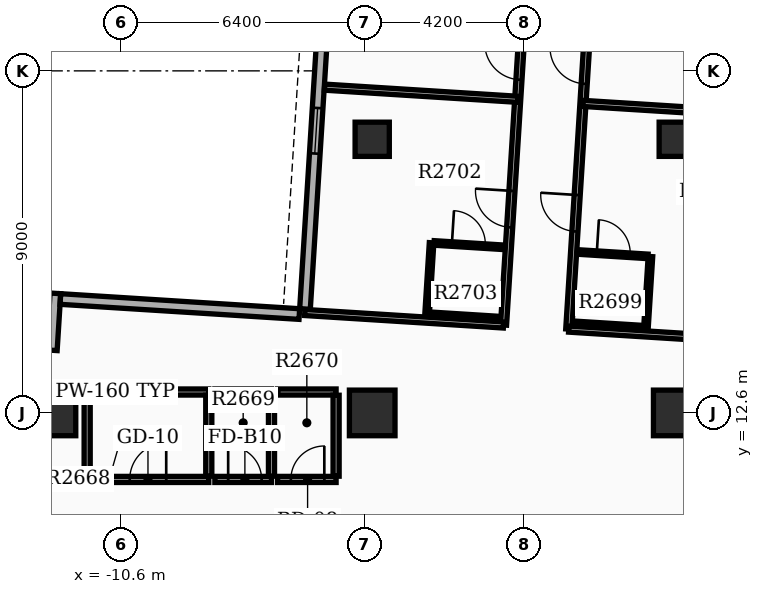
"""IFC4 building model, lengths in metres.
Left out: names, types, materials, properties, quantities, classifications, styles, units other than length and angle.
Written with IfcOpenShell. Run it as: python <this file> out.ifc"""

import sys

from ifc_helpers import new_model, si_unit, direction, frame, frame_2d, origin, origin_2d, place, context, subcontext, project, spatial, rectangle, extrude, element, fill, save


model = new_model("IFC4")
c1 = context("Model", 3, precision=1e-05, world=origin(), true_north=direction((0.0, 1.0)))
c2 = subcontext(c1, "Body", "Model", "MODEL_VIEW")
j1 = project(units=[si_unit("LENGTHUNIT", "METRE"), si_unit("PLANEANGLEUNIT", "RADIAN")], contexts=[c1])
p1 = place(None, origin())
s1 = spatial("IfcSite", under=j1, at=p1, CompositionType="ELEMENT")
p2 = place(p1, origin())
s2 = spatial("IfcBuilding", under=s1, at=p2, CompositionType="ELEMENT")
p3 = place(p2, frame((0.0, 0.0, 168.3)))
s3 = spatial("IfcBuildingStorey", under=s2, at=p3, CompositionType="ELEMENT", Elevation=168.3)
for number, where, z_axis, x_axis in (
    (1, (-12.4, 12.6, 0.0), (0.0, 0.0, 1.0), (1.0, 0.0, 0.0)),
    (2, (4.0, 12.6, 0.0), (0.0, 0.0, 1.0), (1.0, 0.0, 0.0)),
    (3, (-4.0, 12.6, 0.0), (0.0, 0.0, 1.0), (1.0, 0.0, 0.0)),
):
    element("IfcColumn", number, at=place(p3, frame(where, z_axis=z_axis, x_axis=x_axis)), inside=s3, PredefinedType="COLUMN", context=c2, shape_type="SweptSolid", body=[
        extrude(rectangle(XDim=1.2, YDim=1.2, at=origin_2d()), origin(), (0.0, 0.0, 1.0), 3.9),
    ])
for number, where, z_axis, x_axis in (
    (4, (-4.0, 19.8, 0.0), (0.0, 0.0, 1.0), (1.0, 0.0, 0.0)),
    (5, (4.0, 19.8, 0.0), (0.0, 0.0, 1.0), (1.0, 0.0, 0.0)),
):
    element("IfcColumn", number, at=place(p3, frame(where, z_axis=z_axis, x_axis=x_axis)), inside=s3, PredefinedType="COLUMN", context=c2, shape_type="SweptSolid", body=[
        extrude(rectangle(XDim=0.9, YDim=0.9, at=origin_2d()), origin(), (0.0, 0.0, 1.0), 3.9),
    ])
p4 = place(p3, frame((-4.507, 35.393, 0.0), z_axis=(0.0, 0.0, 1.0), x_axis=(-0.062784355807, -0.998027116198, 0.0)))
e6 = element("IfcWall", 6, at=p4, inside=s3, PredefinedType="STANDARD", context=c2, shape_type="SweptSolid", body=[
    extrude(rectangle(XDim=20.1, YDim=0.28, at=frame_2d((10.05, 0.0))), origin(), (0.0, 0.0, 1.0), 2.97),
])
p5 = place(p4, frame((0.85, 0.0, 0.8)))
e7 = element("IfcOpeningElement", 7, at=p5, cuts=e6, PredefinedType="OPENING", context=c2, shape_type="SweptSolid", body=[
    extrude(rectangle(XDim=1.4, YDim=1.6, at=frame_2d((0.7, 0.8))), frame((0.0, 0.15, 0.0), z_axis=(0.0, -1.0, 0.0), x_axis=(1.0, 0.0, 0.0)), (0.0, 0.0, 1.0), 0.3),
])
p6 = place(p4, frame((4.05, 0.0, 0.8)))
e8 = element("IfcOpeningElement", 8, at=p6, cuts=e6, PredefinedType="OPENING", context=c2, shape_type="SweptSolid", body=[
    extrude(rectangle(XDim=1.4, YDim=1.6, at=frame_2d((0.7, 0.8))), frame((0.0, 0.15, 0.0), z_axis=(0.0, -1.0, 0.0), x_axis=(1.0, 0.0, 0.0)), (0.0, 0.0, 1.0), 0.3),
])
p7 = place(p4, frame((7.25, 0.0, 0.8)))
e9 = element("IfcOpeningElement", 9, at=p7, cuts=e6, PredefinedType="OPENING", context=c2, shape_type="SweptSolid", body=[
    extrude(rectangle(XDim=1.4, YDim=1.6, at=frame_2d((0.7, 0.8))), frame((0.0, 0.15, 0.0), z_axis=(0.0, -1.0, 0.0), x_axis=(1.0, 0.0, 0.0)), (0.0, 0.0, 1.0), 0.3),
])
p8 = place(p4, frame((10.95, 0.0, 0.8)))
e10 = element("IfcOpeningElement", 10, at=p8, cuts=e6, PredefinedType="OPENING", context=c2, shape_type="SweptSolid", body=[
    extrude(rectangle(XDim=1.4, YDim=1.6, at=frame_2d((0.7, 0.8))), frame((0.0, 0.15, 0.0), z_axis=(0.0, -1.0, 0.0), x_axis=(1.0, 0.0, 0.0)), (0.0, 0.0, 1.0), 0.3),
])
p9 = place(p4, frame((14.799, 0.0, 0.85)))
e11 = element("IfcOpeningElement", 11, at=p9, cuts=e6, PredefinedType="OPENING", context=c2, shape_type="SweptSolid", body=[
    extrude(rectangle(XDim=1.2, YDim=1.6, at=frame_2d((0.6, 0.8))), frame((0.0, 0.15, 0.0), z_axis=(0.0, -1.0, 0.0), x_axis=(1.0, 0.0, 0.0)), (0.0, 0.0, 1.0), 0.3),
])
p10 = place(p3, frame((-12.43, 14.249, 0.0), z_axis=(0.0, 0.0, 1.0), x_axis=(0.062824119533, 0.998024613927, 0.0)))
e12 = element("IfcWall", 12, at=p10, inside=s3, PredefinedType="STANDARD", context=c2, shape_type="SweptSolid", body=[
    extrude(rectangle(XDim=1.5, YDim=0.28, at=frame_2d((0.75, 0.0))), origin(), (0.0, 0.0, 1.0), 2.97),
])
p11 = place(p3, frame((-12.205, 15.597, 0.0), z_axis=(0.0, 0.0, 1.0), x_axis=(0.998024885752, -0.062819801181, 0.0)))
e13 = element("IfcWall", 13, at=p11, inside=s3, PredefinedType="STANDARD", context=c2, shape_type="SweptSolid", body=[
    extrude(rectangle(XDim=6.3, YDim=0.28, at=frame_2d((3.15, 0.0))), origin(), (0.0, 0.0, 1.0), 2.97),
])
p12 = place(p3, frame((-11.5, 10.85, 0.0), z_axis=(0.0, 0.0, 1.0), x_axis=(1.0, 0.0, 0.0)))
e14 = element("IfcWall", 14, at=p12, inside=s3, PredefinedType="PARTITIONING", context=c2, shape_type="SweptSolid", body=[
    extrude(rectangle(XDim=3.2, YDim=0.16, at=frame_2d((1.6, 0.0))), origin(), (0.0, 0.0, 1.0), 2.96),
])
p13 = place(p12, frame((1.12, 0.0, 0.0)))
e15 = element("IfcOpeningElement", 15, at=p13, cuts=e14, PredefinedType="OPENING", context=c2, shape_type="SweptSolid", body=[
    extrude(rectangle(XDim=0.96, YDim=2.15, at=frame_2d((0.48, 1.075))), frame((0.0, 0.09, 0.0), z_axis=(0.0, -1.0, 0.0), x_axis=(1.0, 0.0, 0.0)), (0.0, 0.0, 1.0), 0.18),
])
p14 = place(p3, frame((-11.5, 13.15, 0.0), z_axis=(0.0, 0.0, 1.0), x_axis=(1.0, 0.0, 0.0)))
e16 = element("IfcWall", 16, at=p14, inside=s3, PredefinedType="PARTITIONING", context=c2, shape_type="SweptSolid", body=[
    extrude(rectangle(XDim=3.2, YDim=0.16, at=frame_2d((1.6, 0.0))), origin(), (0.0, 0.0, 1.0), 2.96),
])
for number, where, z_axis, x_axis in (
    (17, (-11.5, 10.935, 0.0), (0.0, 0.0, 1.0), (0.0, 1.0, 0.0)),
    (18, (-8.3, 10.935, 0.0), (0.0, 0.0, 1.0), (0.0, 1.0, 0.0)),
):
    element("IfcWall", number, at=place(p3, frame(where, z_axis=z_axis, x_axis=x_axis)), inside=s3, PredefinedType="PARTITIONING", context=c2, shape_type="SweptSolid", body=[
        extrude(rectangle(XDim=2.13, YDim=0.16, at=frame_2d((1.065, 0.0))), origin(), (0.0, 0.0, 1.0), 2.96),
    ])
p15 = place(p3, frame((-8.14, 10.85, 0.0), z_axis=(0.0, 0.0, 1.0), x_axis=(1.0, 0.0, 0.0)))
e19 = element("IfcWall", 19, at=p15, inside=s3, PredefinedType="PARTITIONING", context=c2, shape_type="SweptSolid", body=[
    extrude(rectangle(XDim=1.49, YDim=0.16, at=frame_2d((0.745, 0.0))), origin(), (0.0, 0.0, 1.0), 2.96),
])
p16 = place(p15, frame((0.35, 0.0, 0.0)))
e20 = element("IfcOpeningElement", 20, at=p16, cuts=e19, PredefinedType="OPENING", context=c2, shape_type="SweptSolid", body=[
    extrude(rectangle(XDim=0.88, YDim=2.1, at=frame_2d((0.44, 1.05))), frame((0.0, 0.09, 0.0), z_axis=(0.0, -1.0, 0.0), x_axis=(1.0, 0.0, 0.0)), (0.0, 0.0, 1.0), 0.18),
])
p17 = place(p3, frame((-8.14, 13.15, 0.0), z_axis=(0.0, 0.0, 1.0), x_axis=(1.0, 0.0, 0.0)))
e21 = element("IfcWall", 21, at=p17, inside=s3, PredefinedType="PARTITIONING", context=c2, shape_type="SweptSolid", body=[
    extrude(rectangle(XDim=1.49, YDim=0.16, at=frame_2d((0.745, 0.0))), origin(), (0.0, 0.0, 1.0), 2.96),
])
p18 = place(p3, frame((-6.65, 10.935, 0.0), z_axis=(0.0, 0.0, 1.0), x_axis=(0.0, 1.0, 0.0)))
e22 = element("IfcWall", 22, at=p18, inside=s3, PredefinedType="PARTITIONING", context=c2, shape_type="SweptSolid", body=[
    extrude(rectangle(XDim=2.13, YDim=0.16, at=frame_2d((1.065, 0.0))), origin(), (0.0, 0.0, 1.0), 2.96),
])
p19 = place(p3, frame((-6.49, 10.85, 0.0), z_axis=(0.0, 0.0, 1.0), x_axis=(1.0, 0.0, 0.0)))
e23 = element("IfcWall", 23, at=p19, inside=s3, PredefinedType="PARTITIONING", context=c2, shape_type="SweptSolid", body=[
    extrude(rectangle(XDim=1.54, YDim=0.16, at=frame_2d((0.77, 0.0))), origin(), (0.0, 0.0, 1.0), 2.96),
])
p20 = place(p19, frame((0.35, 0.0, 0.0)))
e24 = element("IfcOpeningElement", 24, at=p20, cuts=e23, PredefinedType="OPENING", context=c2, shape_type="SweptSolid", body=[
    extrude(rectangle(XDim=0.88, YDim=2.15, at=frame_2d((0.44, 1.075))), frame((0.0, 0.09, 0.0), z_axis=(0.0, -1.0, 0.0), x_axis=(1.0, 0.0, 0.0)), (0.0, 0.0, 1.0), 0.18),
])
p21 = place(p3, frame((-6.49, 13.15, 0.0), z_axis=(0.0, 0.0, 1.0), x_axis=(1.0, 0.0, 0.0)))
e25 = element("IfcWall", 25, at=p21, inside=s3, PredefinedType="PARTITIONING", context=c2, shape_type="SweptSolid", body=[
    extrude(rectangle(XDim=1.54, YDim=0.16, at=frame_2d((0.77, 0.0))), origin(), (0.0, 0.0, 1.0), 2.96),
])
p22 = place(p3, frame((-4.95, 10.935, 0.0), z_axis=(0.0, 0.0, 1.0), x_axis=(0.0, 1.0, 0.0)))
e26 = element("IfcWall", 26, at=p22, inside=s3, PredefinedType="PARTITIONING", context=c2, shape_type="SweptSolid", body=[
    extrude(rectangle(XDim=2.13, YDim=0.16, at=frame_2d((1.065, 0.0))), origin(), (0.0, 0.0, 1.0), 2.96),
])
p23 = place(p3, frame((1.172, 14.806, 0.0), z_axis=(0.0, 0.0, 1.0), x_axis=(0.062771584278, 0.998027919553, 0.0)))
e27 = element("IfcWall", 27, at=p23, inside=s3, PredefinedType="PARTITIONING", context=c2, shape_type="SweptSolid", body=[
    extrude(rectangle(XDim=9.7, YDim=0.16, at=frame_2d((4.85, 0.0))), origin(), (0.0, 0.0, 1.0), 2.96),
])
p24 = place(p23, frame((2.575, 0.0, 0.0)))
e28 = element("IfcOpeningElement", 28, at=p24, cuts=e27, PredefinedType="OPENING", context=c2, shape_type="SweptSolid", body=[
    extrude(rectangle(XDim=0.96, YDim=2.15, at=frame_2d((0.48, 1.075))), frame((0.0, 0.09, 0.0), z_axis=(0.0, -1.0, 0.0), x_axis=(1.0, 0.0, 0.0)), (0.0, 0.0, 1.0), 0.18),
])
p25 = place(p23, frame((6.467, 0.0, 0.0)))
e29 = element("IfcOpeningElement", 29, at=p25, cuts=e27, PredefinedType="OPENING", context=c2, shape_type="SweptSolid", body=[
    extrude(rectangle(XDim=0.96, YDim=2.15, at=frame_2d((0.48, 1.075))), frame((0.0, 0.09, 0.0), z_axis=(0.0, -1.0, 0.0), x_axis=(1.0, 0.0, 0.0)), (0.0, 0.0, 1.0), 0.18),
])
p26 = place(p3, frame((1.172, 14.806, 0.0), z_axis=(0.0, 0.0, 1.0), x_axis=(0.998025657815, -0.06280753413, 0.0)))
e30 = element("IfcWall", 30, at=p26, inside=s3, PredefinedType="PARTITIONING", context=c2, shape_type="SweptSolid", body=[
    extrude(rectangle(XDim=6.48, YDim=0.16, at=frame_2d((3.24, 0.0))), origin(), (0.0, 0.0, 1.0), 2.96),
])
p27 = place(p3, frame((1.546, 20.744, 0.0), z_axis=(0.0, 0.0, 1.0), x_axis=(0.998025479614, -0.06281036572, 0.0)))
e31 = element("IfcWall", 31, at=p27, inside=s3, PredefinedType="PARTITIONING", context=c2, shape_type="SweptSolid", body=[
    extrude(rectangle(XDim=6.332, YDim=0.16, at=frame_2d((3.166, 0.0))), origin(), (0.0, 0.0, 1.0), 2.96),
])
p28 = place(p3, frame((1.44, 16.833, 0.0), z_axis=(0.0, 0.0, 1.0), x_axis=(0.998027443946, -0.062779145668, 0.0)))
e32 = element("IfcWall", 32, at=p28, inside=s3, PredefinedType="PARTITIONING", context=c2, shape_type="SweptSolid", body=[
    extrude(rectangle(XDim=1.82, YDim=0.12, at=frame_2d((0.91, 0.0))), origin(), (0.0, 0.0, 1.0), 2.96),
])
p29 = place(p28, frame((0.47, 0.0, 0.0)))
e33 = element("IfcOpeningElement", 33, at=p29, cuts=e32, PredefinedType="OPENING", context=c2, shape_type="SweptSolid", body=[
    extrude(rectangle(XDim=0.88, YDim=2.1, at=frame_2d((0.44, 1.05))), frame((0.0, 0.07, 0.0), z_axis=(0.0, -1.0, 0.0), x_axis=(1.0, 0.0, 0.0)), (0.0, 0.0, 1.0), 0.14),
])
p30 = place(p3, frame((1.322, 14.957, 0.0), z_axis=(0.0, 0.0, 1.0), x_axis=(0.998027443946, -0.062779145668, 0.0)))
e34 = element("IfcWall", 34, at=p30, inside=s3, PredefinedType="PARTITIONING", context=c2, shape_type="SweptSolid", body=[
    extrude(rectangle(XDim=1.82, YDim=0.12, at=frame_2d((0.91, 0.0))), origin(), (0.0, 0.0, 1.0), 2.96),
])
p31 = place(p3, frame((3.203, 14.838, 0.0), z_axis=(0.0, 0.0, 1.0), x_axis=(0.062847152131, 0.998023163794, 0.0)))
e35 = element("IfcWall", 35, at=p31, inside=s3, PredefinedType="PARTITIONING", context=c2, shape_type="SweptSolid", body=[
    extrude(rectangle(XDim=1.88, YDim=0.12, at=frame_2d((0.94, 0.0))), origin(), (0.0, 0.0, 1.0), 2.96),
])
p32 = place(p3, frame((-0.545, 14.914, 0.0), z_axis=(0.0, 0.0, 1.0), x_axis=(0.062796654085, 0.998026342456, 0.0)))
e36 = element("IfcWall", 36, at=p32, inside=s3, PredefinedType="PARTITIONING", context=c2, shape_type="SweptSolid", body=[
    extrude(rectangle(XDim=9.7, YDim=0.16, at=frame_2d((4.85, 0.0))), origin(), (0.0, 0.0, 1.0), 2.96),
])
p33 = place(p32, frame((2.575, 0.0, 0.0)))
e37 = element("IfcOpeningElement", 37, at=p33, cuts=e36, PredefinedType="OPENING", context=c2, shape_type="SweptSolid", body=[
    extrude(rectangle(XDim=0.96, YDim=2.15, at=frame_2d((0.48, 1.075))), frame((0.0, 0.09, 0.0), z_axis=(0.0, -1.0, 0.0), x_axis=(1.0, 0.0, 0.0)), (0.0, 0.0, 1.0), 0.18),
])
p34 = place(p32, frame((6.467, 0.0, 0.0)))
e38 = element("IfcOpeningElement", 38, at=p34, cuts=e36, PredefinedType="OPENING", context=c2, shape_type="SweptSolid", body=[
    extrude(rectangle(XDim=0.96, YDim=2.15, at=frame_2d((0.48, 1.075))), frame((0.0, 0.09, 0.0), z_axis=(0.0, -1.0, 0.0), x_axis=(1.0, 0.0, 0.0)), (0.0, 0.0, 1.0), 0.18),
])
p35 = place(p3, frame((-0.545, 14.914, 0.0), z_axis=(0.0, 0.0, 1.0), x_axis=(-0.998025838074, 0.062804669704, 0.0)))
e39 = element("IfcWall", 39, at=p35, inside=s3, PredefinedType="PARTITIONING", context=c2, shape_type="SweptSolid", body=[
    extrude(rectangle(XDim=5.24, YDim=0.16, at=frame_2d((2.62, 0.0))), origin(), (0.0, 0.0, 1.0), 2.96),
])
p36 = place(p3, frame((-0.171, 20.852, 0.0), z_axis=(0.0, 0.0, 1.0), x_axis=(-0.998025621735, 0.06280810744, 0.0)))
e40 = element("IfcWall", 40, at=p36, inside=s3, PredefinedType="PARTITIONING", context=c2, shape_type="SweptSolid", body=[
    extrude(rectangle(XDim=5.092, YDim=0.16, at=frame_2d((2.546, 0.0))), origin(), (0.0, 0.0, 1.0), 2.96),
])
p37 = place(p3, frame((-2.373, 17.073, 0.0), z_axis=(0.0, 0.0, 1.0), x_axis=(0.998027443946, -0.062779145668, 0.0)))
e41 = element("IfcWall", 41, at=p37, inside=s3, PredefinedType="PARTITIONING", context=c2, shape_type="SweptSolid", body=[
    extrude(rectangle(XDim=1.82, YDim=0.12, at=frame_2d((0.91, 0.0))), origin(), (0.0, 0.0, 1.0), 2.96),
])
p38 = place(p37, frame((0.47, 0.0, 0.0)))
e42 = element("IfcOpeningElement", 42, at=p38, cuts=e41, PredefinedType="OPENING", context=c2, shape_type="SweptSolid", body=[
    extrude(rectangle(XDim=0.88, YDim=2.1, at=frame_2d((0.44, 1.05))), frame((0.0, 0.07, 0.0), z_axis=(0.0, -1.0, 0.0), x_axis=(1.0, 0.0, 0.0)), (0.0, 0.0, 1.0), 0.14),
])
p39 = place(p3, frame((-2.491, 15.196, 0.0), z_axis=(0.0, 0.0, 1.0), x_axis=(0.998027443946, -0.062779145668, 0.0)))
e43 = element("IfcWall", 43, at=p39, inside=s3, PredefinedType="PARTITIONING", context=c2, shape_type="SweptSolid", body=[
    extrude(rectangle(XDim=1.82, YDim=0.12, at=frame_2d((0.91, 0.0))), origin(), (0.0, 0.0, 1.0), 2.96),
])
p40 = place(p3, frame((-2.556, 15.2, 0.0), z_axis=(0.0, 0.0, 1.0), x_axis=(0.062847152131, 0.998023163794, 0.0)))
e44 = element("IfcWall", 44, at=p40, inside=s3, PredefinedType="PARTITIONING", context=c2, shape_type="SweptSolid", body=[
    extrude(rectangle(XDim=1.88, YDim=0.12, at=frame_2d((0.94, 0.0))), origin(), (0.0, 0.0, 1.0), 2.96),
])
p41 = place(p9, origin())
e45 = element("IfcWindow", 45, at=p41, inside=s3, PartitioningType="SINGLE_PANEL", PredefinedType="WINDOW", context=c2, shape_type="SweptSolid", body=[
    extrude(rectangle(XDim=1.2, YDim=1.6, at=frame_2d((0.6, 0.8))), frame((0.0, 0.03, 0.0), z_axis=(0.0, -1.0, 0.0), x_axis=(1.0, 0.0, 0.0)), (0.0, 0.0, 1.0), 0.06),
])
fill(e11, e45)
p42 = place(p13, origin())
e46 = element("IfcDoor", 46, at=p42, inside=s3, OperationType="SINGLE_SWING_RIGHT", PredefinedType="DOOR", context=c2, shape_type="SweptSolid", body=[
    extrude(rectangle(XDim=0.96, YDim=2.15, at=frame_2d((0.48, 1.075))), frame((0.0, 0.025, 0.0), z_axis=(0.0, -1.0, 0.0), x_axis=(1.0, 0.0, 0.0)), (0.0, 0.0, 1.0), 0.05),
])
fill(e15, e46)
p43 = place(p16, origin())
e47 = element("IfcDoor", 47, at=p43, inside=s3, OperationType="SINGLE_SWING_LEFT", PredefinedType="DOOR", context=c2, shape_type="SweptSolid", body=[
    extrude(rectangle(XDim=0.88, YDim=2.1, at=frame_2d((0.44, 1.05))), frame((0.0, 0.025, 0.0), z_axis=(0.0, -1.0, 0.0), x_axis=(1.0, 0.0, 0.0)), (0.0, 0.0, 1.0), 0.05),
])
fill(e20, e47)
p44 = place(p20, origin())
e48 = element("IfcDoor", 48, at=p44, inside=s3, OperationType="SINGLE_SWING_RIGHT", PredefinedType="DOOR", context=c2, shape_type="SweptSolid", body=[
    extrude(rectangle(XDim=0.88, YDim=2.15, at=frame_2d((0.44, 1.075))), frame((0.0, 0.025, 0.0), z_axis=(0.0, -1.0, 0.0), x_axis=(1.0, 0.0, 0.0)), (0.0, 0.0, 1.0), 0.05),
])
fill(e24, e48)
p45 = place(p24, origin())
e49 = element("IfcDoor", 49, at=p45, inside=s3, OperationType="SINGLE_SWING_RIGHT", PredefinedType="DOOR", context=c2, shape_type="SweptSolid", body=[
    extrude(rectangle(XDim=0.96, YDim=2.15, at=frame_2d((0.48, 1.075))), frame((0.0, 0.025, 0.0), z_axis=(0.0, -1.0, 0.0), x_axis=(1.0, 0.0, 0.0)), (0.0, 0.0, 1.0), 0.05),
])
fill(e28, e49)
p46 = place(p29, origin())
e50 = element("IfcDoor", 50, at=p46, inside=s3, OperationType="SINGLE_SWING_LEFT", PredefinedType="DOOR", context=c2, shape_type="SweptSolid", body=[
    extrude(rectangle(XDim=0.88, YDim=2.1, at=frame_2d((0.44, 1.05))), frame((0.0, 0.025, 0.0), z_axis=(0.0, -1.0, 0.0), x_axis=(1.0, 0.0, 0.0)), (0.0, 0.0, 1.0), 0.05),
])
fill(e33, e50)
p47 = place(p25, origin())
e51 = element("IfcDoor", 51, at=p47, inside=s3, OperationType="SINGLE_SWING_RIGHT", PredefinedType="DOOR", context=c2, shape_type="SweptSolid", body=[
    extrude(rectangle(XDim=0.96, YDim=2.15, at=frame_2d((0.48, 1.075))), frame((0.0, 0.025, 0.0), z_axis=(0.0, -1.0, 0.0), x_axis=(1.0, 0.0, 0.0)), (0.0, 0.0, 1.0), 0.05),
])
fill(e29, e51)
p48 = place(p33, origin())
e52 = element("IfcDoor", 52, at=p48, inside=s3, OperationType="SINGLE_SWING_RIGHT", PredefinedType="DOOR", context=c2, shape_type="SweptSolid", body=[
    extrude(rectangle(XDim=0.96, YDim=2.15, at=frame_2d((0.48, 1.075))), frame((0.0, 0.025, 0.0), z_axis=(0.0, -1.0, 0.0), x_axis=(1.0, 0.0, 0.0)), (0.0, 0.0, 1.0), 0.05),
])
fill(e37, e52)
p49 = place(p38, origin())
e53 = element("IfcDoor", 53, at=p49, inside=s3, OperationType="SINGLE_SWING_LEFT", PredefinedType="DOOR", context=c2, shape_type="SweptSolid", body=[
    extrude(rectangle(XDim=0.88, YDim=2.1, at=frame_2d((0.44, 1.05))), frame((0.0, 0.025, 0.0), z_axis=(0.0, -1.0, 0.0), x_axis=(1.0, 0.0, 0.0)), (0.0, 0.0, 1.0), 0.05),
])
fill(e42, e53)
p50 = place(p34, origin())
e54 = element("IfcDoor", 54, at=p50, inside=s3, OperationType="SINGLE_SWING_RIGHT", PredefinedType="DOOR", context=c2, shape_type="SweptSolid", body=[
    extrude(rectangle(XDim=0.96, YDim=2.15, at=frame_2d((0.48, 1.075))), frame((0.0, 0.025, 0.0), z_axis=(0.0, -1.0, 0.0), x_axis=(1.0, 0.0, 0.0)), (0.0, 0.0, 1.0), 0.05),
])
fill(e38, e54)
save(model, sys.argv[1])
